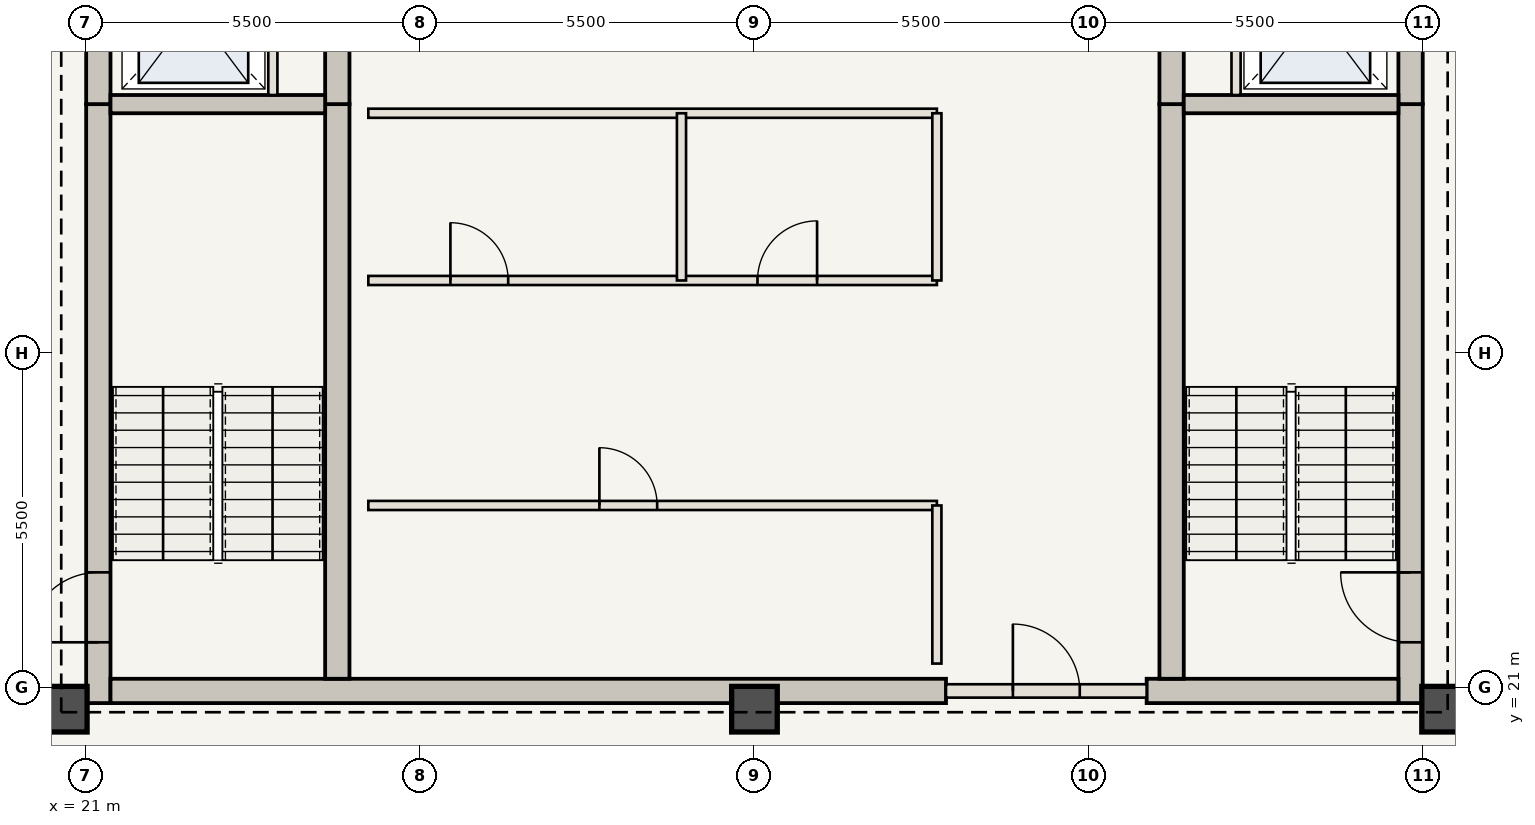
"""IFC4 building model, lengths in metres.
Left out: names, types, materials, properties, quantities, classifications, styles, units other than length and angle.
Written with IfcOpenShell. Run it as: python <this file> out.ifc"""

import sys

from ifc_helpers import new_model, si_unit, direction, frame, frame_2d, origin, origin_2d, place, context, subcontext, project, spatial, rectangle, extrude, element, fill, save


model = new_model("IFC4")
c1 = context("Model", 3, precision=1e-05, world=origin(), true_north=direction((0.0, 1.0)))
c2 = subcontext(c1, "Body", "Model", "MODEL_VIEW")
j1 = project(units=[si_unit("LENGTHUNIT", "METRE"), si_unit("PLANEANGLEUNIT", "RADIAN")], contexts=[c1])
p1 = place(None, origin())
s1 = spatial("IfcSite", under=j1, at=p1, CompositionType="ELEMENT")
p2 = place(p1, origin())
s2 = spatial("IfcBuilding", under=s1, at=p2, CompositionType="ELEMENT")
p3 = place(p2, frame((0.0, 0.0, 277.55)))
s3 = spatial("IfcBuildingStorey", under=s2, at=p3, CompositionType="ELEMENT", Elevation=277.55)
p4 = place(p3, frame((21.21, 20.75, 0.0), z_axis=(0.0, 0.0, 1.0), x_axis=(0.0, 1.0, 0.0)))
e1 = element("IfcWall", 1, at=p4, inside=s3, PredefinedType="SHEAR", context=c2, shape_type="SweptSolid", body=[
    extrude(rectangle(XDim=9.85, YDim=0.4, at=frame_2d((4.925, 0.0))), origin(), (0.0, 0.0, 1.0), 3.85),
])
p5 = place(p4, frame((1.0, 0.0, 0.0)))
e2 = element("IfcOpeningElement", 2, at=p5, cuts=e1, PredefinedType="OPENING", context=c2, shape_type="SweptSolid", body=[
    extrude(rectangle(XDim=1.15, YDim=2.15, at=frame_2d((0.575, 1.075))), frame((0.0, 0.21, 0.0), z_axis=(0.0, -1.0, 0.0), x_axis=(1.0, 0.0, 0.0)), (0.0, 0.0, 1.0), 0.42),
])
p6 = place(p3, frame((21.21, 30.6, 0.0), z_axis=(0.0, 0.0, 1.0), x_axis=(0.0, 1.0, 0.0)))
e3 = element("IfcWall", 3, at=p6, inside=s3, PredefinedType="SHEAR", context=c2, shape_type="SweptSolid", body=[
    extrude(rectangle(XDim=12.6, YDim=0.4, at=frame_2d((6.3, 0.0))), origin(), (0.0, 0.0, 1.0), 3.85),
])
p7 = place(p6, frame((4.2, 0.0, 0.0)))
e4 = element("IfcOpeningElement", 4, at=p7, cuts=e3, PredefinedType="OPENING", context=c2, shape_type="SweptSolid", body=[
    extrude(rectangle(XDim=1.1, YDim=2.15, at=frame_2d((0.55, 1.075))), frame((0.0, 0.21, 0.0), z_axis=(0.0, -1.0, 0.0), x_axis=(1.0, 0.0, 0.0)), (0.0, 0.0, 1.0), 0.42),
])
p8 = place(p6, frame((9.2, 0.0, 0.0)))
e5 = element("IfcOpeningElement", 5, at=p8, cuts=e3, PredefinedType="OPENING", context=c2, shape_type="SweptSolid", body=[
    extrude(rectangle(XDim=0.92, YDim=2.1, at=frame_2d((0.46, 1.05))), frame((0.0, 0.21, 0.0), z_axis=(0.0, -1.0, 0.0), x_axis=(1.0, 0.0, 0.0)), (0.0, 0.0, 1.0), 0.42),
])
p9 = place(p3, frame((42.79, 20.75, 0.0), z_axis=(0.0, 0.0, 1.0), x_axis=(0.0, 1.0, 0.0)))
e6 = element("IfcWall", 6, at=p9, inside=s3, PredefinedType="SHEAR", context=c2, shape_type="SweptSolid", body=[
    extrude(rectangle(XDim=9.85, YDim=0.4, at=frame_2d((4.925, 0.0))), origin(), (0.0, 0.0, 1.0), 3.85),
])
p10 = place(p9, frame((1.0, 0.0, 0.0)))
e7 = element("IfcOpeningElement", 7, at=p10, cuts=e6, PredefinedType="OPENING", context=c2, shape_type="SweptSolid", body=[
    extrude(rectangle(XDim=1.15, YDim=2.15, at=frame_2d((0.575, 1.075))), frame((0.0, 0.21, 0.0), z_axis=(0.0, -1.0, 0.0), x_axis=(1.0, 0.0, 0.0)), (0.0, 0.0, 1.0), 0.42),
])
p11 = place(p3, frame((42.79, 30.6, 0.0), z_axis=(0.0, 0.0, 1.0), x_axis=(0.0, 1.0, 0.0)))
e8 = element("IfcWall", 8, at=p11, inside=s3, PredefinedType="SHEAR", context=c2, shape_type="SweptSolid", body=[
    extrude(rectangle(XDim=12.6, YDim=0.4, at=frame_2d((6.3, 0.0))), origin(), (0.0, 0.0, 1.0), 3.85),
])
p12 = place(p11, frame((4.2, 0.0, 0.0)))
e9 = element("IfcOpeningElement", 9, at=p12, cuts=e8, PredefinedType="OPENING", context=c2, shape_type="SweptSolid", body=[
    extrude(rectangle(XDim=1.1, YDim=2.15, at=frame_2d((0.55, 1.075))), frame((0.0, 0.21, 0.0), z_axis=(0.0, -1.0, 0.0), x_axis=(1.0, 0.0, 0.0)), (0.0, 0.0, 1.0), 0.42),
])
p13 = place(p11, frame((8.05, 0.0, 0.0)))
e10 = element("IfcOpeningElement", 10, at=p13, cuts=e8, PredefinedType="OPENING", context=c2, shape_type="SweptSolid", body=[
    extrude(rectangle(XDim=0.88, YDim=2.1, at=frame_2d((0.44, 1.05))), frame((0.0, 0.21, 0.0), z_axis=(0.0, -1.0, 0.0), x_axis=(1.0, 0.0, 0.0)), (0.0, 0.0, 1.0), 0.42),
])
p14 = place(p11, frame((9.45, 0.0, 0.0)))
e11 = element("IfcOpeningElement", 11, at=p14, cuts=e8, PredefinedType="OPENING", context=c2, shape_type="SweptSolid", body=[
    extrude(rectangle(XDim=0.88, YDim=2.1, at=frame_2d((0.44, 1.05))), frame((0.0, 0.21, 0.0), z_axis=(0.0, -1.0, 0.0), x_axis=(1.0, 0.0, 0.0)), (0.0, 0.0, 1.0), 0.42),
])
p15 = place(p11, frame((10.85, 0.0, 0.0)))
e12 = element("IfcOpeningElement", 12, at=p15, cuts=e8, PredefinedType="OPENING", context=c2, shape_type="SweptSolid", body=[
    extrude(rectangle(XDim=0.88, YDim=2.1, at=frame_2d((0.44, 1.05))), frame((0.0, 0.21, 0.0), z_axis=(0.0, -1.0, 0.0), x_axis=(1.0, 0.0, 0.0)), (0.0, 0.0, 1.0), 0.42),
])
p16 = place(p3, frame((21.41, 20.95, 0.0), z_axis=(0.0, 0.0, 1.0), x_axis=(1.0, 0.0, 0.0)))
e13 = element("IfcWall", 13, at=p16, inside=s3, PredefinedType="SHEAR", context=c2, shape_type="SweptSolid", body=[
    extrude(rectangle(XDim=13.74, YDim=0.4, at=frame_2d((6.87, 0.0))), origin(), (0.0, 0.0, 1.0), 3.85),
])
p17 = place(p3, frame((38.45, 20.95, 0.0), z_axis=(0.0, 0.0, 1.0), x_axis=(1.0, 0.0, 0.0)))
e14 = element("IfcWall", 14, at=p17, inside=s3, PredefinedType="SHEAR", context=c2, shape_type="SweptSolid", body=[
    extrude(rectangle(XDim=4.14, YDim=0.4, at=frame_2d((2.07, 0.0))), origin(), (0.0, 0.0, 1.0), 3.85),
])
p18 = place(p3, frame((25.14, 21.15, 0.0), z_axis=(0.0, 0.0, 1.0), x_axis=(0.0, 1.0, 0.0)))
e15 = element("IfcWall", 15, at=p18, inside=s3, PredefinedType="SHEAR", context=c2, shape_type="SweptSolid", body=[
    extrude(rectangle(XDim=9.45, YDim=0.4, at=frame_2d((4.725, 0.0))), origin(), (0.0, 0.0, 1.0), 3.85),
])
p19 = place(p3, frame((25.14, 30.6, 0.0), z_axis=(0.0, 0.0, 1.0), x_axis=(0.0, 1.0, 0.0)))
e16 = element("IfcWall", 16, at=p19, inside=s3, PredefinedType="SHEAR", context=c2, shape_type="SweptSolid", body=[
    extrude(rectangle(XDim=12.2, YDim=0.4, at=frame_2d((6.1, 0.0))), origin(), (0.0, 0.0, 1.0), 3.85),
])
p20 = place(p19, frame((6.25, 0.0, 0.0)))
e17 = element("IfcOpeningElement", 17, at=p20, cuts=e16, PredefinedType="OPENING", context=c2, shape_type="SweptSolid", body=[
    extrude(rectangle(XDim=1.1, YDim=2.15, at=frame_2d((0.55, 1.075))), frame((0.0, 0.21, 0.0), z_axis=(0.0, -1.0, 0.0), x_axis=(1.0, 0.0, 0.0)), (0.0, 0.0, 1.0), 0.42),
])
p21 = place(p3, frame((38.86, 21.15, 0.0), z_axis=(0.0, 0.0, 1.0), x_axis=(0.0, 1.0, 0.0)))
e18 = element("IfcWall", 18, at=p21, inside=s3, PredefinedType="SHEAR", context=c2, shape_type="SweptSolid", body=[
    extrude(rectangle(XDim=9.45, YDim=0.4, at=frame_2d((4.725, 0.0))), origin(), (0.0, 0.0, 1.0), 3.85),
])
p22 = place(p3, frame((38.86, 30.6, 0.0), z_axis=(0.0, 0.0, 1.0), x_axis=(0.0, 1.0, 0.0)))
e19 = element("IfcWall", 19, at=p22, inside=s3, PredefinedType="SHEAR", context=c2, shape_type="SweptSolid", body=[
    extrude(rectangle(XDim=12.2, YDim=0.4, at=frame_2d((6.1, 0.0))), origin(), (0.0, 0.0, 1.0), 3.85),
])
for number, where, z_axis, x_axis in (
    (20, (20.65, 20.65, 0.0), (0.0, 0.0, 1.0), (1.0, 0.0, 0.0)),
    (21, (32.0, 20.65, 0.0), (0.0, 0.0, 1.0), (1.0, 0.0, 0.0)),
    (22, (43.35, 20.65, 0.0), (0.0, 0.0, 1.0), (1.0, 0.0, 0.0)),
):
    element("IfcColumn", number, at=place(p3, frame(where, z_axis=z_axis, x_axis=x_axis)), inside=s3, PredefinedType="COLUMN", context=c2, shape_type="SweptSolid", body=[
        extrude(rectangle(XDim=0.75, YDim=0.75, at=origin_2d()), origin(), (0.0, 0.0, 1.0), 3.85),
    ])
for number, where, z_axis, x_axis in (
    (23, (21.41, 30.6, 0.0), (0.0, 0.0, 1.0), (1.0, 0.0, 0.0)),
    (24, (39.06, 30.6, 0.0), (0.0, 0.0, 1.0), (1.0, 0.0, 0.0)),
):
    element("IfcWall", number, at=place(p3, frame(where, z_axis=z_axis, x_axis=x_axis)), inside=s3, PredefinedType="SHEAR", context=c2, shape_type="SweptSolid", body=[
        extrude(rectangle(XDim=3.53, YDim=0.3, at=frame_2d((1.765, 0.0))), origin(), (0.0, 0.0, 1.0), 3.685),
    ])
for number, where, z_axis, x_axis in (
    (25, (24.08, 30.75, 0.0), (0.0, 0.0, 1.0), (0.0, 1.0, 0.0)),
    (26, (39.92, 30.75, 0.0), (0.0, 0.0, 1.0), (0.0, 1.0, 0.0)),
):
    element("IfcWall", number, at=place(p3, frame(where, z_axis=z_axis, x_axis=x_axis)), inside=s3, PredefinedType="STANDARD", context=c2, shape_type="SweptSolid", body=[
        extrude(rectangle(XDim=2.65, YDim=0.15, at=frame_2d((1.325, 0.0))), origin(), (0.0, 0.0, 1.0), 3.685),
    ])
p23 = place(p3, frame((35.15, 20.95, 0.0), z_axis=(0.0, 0.0, 1.0), x_axis=(1.0, 0.0, 0.0)))
e27 = element("IfcWall", 27, at=p23, inside=s3, PredefinedType="STANDARD", context=c2, shape_type="SweptSolid", body=[
    extrude(rectangle(XDim=3.3, YDim=0.22, at=frame_2d((1.65, 0.0))), origin(), (0.0, 0.0, 1.0), 3.685),
])
p24 = place(p23, frame((1.1, 0.0, 0.0)))
e28 = element("IfcOpeningElement", 28, at=p24, cuts=e27, PredefinedType="OPENING", context=c2, shape_type="SweptSolid", body=[
    extrude(rectangle(XDim=1.1, YDim=2.15, at=frame_2d((0.55, 1.075))), frame((0.0, 0.12, 0.0), z_axis=(0.0, -1.0, 0.0), x_axis=(1.0, 0.0, 0.0)), (0.0, 0.0, 1.0), 0.24),
])
p25 = place(p3, frame((25.65, 24.0, 0.0), z_axis=(0.0, 0.0, 1.0), x_axis=(1.0, 0.0, 0.0)))
e29 = element("IfcWall", 29, at=p25, inside=s3, PredefinedType="STANDARD", context=c2, shape_type="SweptSolid", body=[
    extrude(rectangle(XDim=9.35, YDim=0.15, at=frame_2d((4.675, 0.0))), origin(), (0.0, 0.0, 1.0), 3.685),
])
p26 = place(p25, frame((3.8, 0.0, 0.0)))
e30 = element("IfcOpeningElement", 30, at=p26, cuts=e29, PredefinedType="OPENING", context=c2, shape_type="SweptSolid", body=[
    extrude(rectangle(XDim=0.95, YDim=2.15, at=frame_2d((0.475, 1.075))), frame((0.0, 0.085, 0.0), z_axis=(0.0, -1.0, 0.0), x_axis=(1.0, 0.0, 0.0)), (0.0, 0.0, 1.0), 0.17),
])
p27 = place(p3, frame((35.0, 21.4, 0.0), z_axis=(0.0, 0.0, 1.0), x_axis=(0.0, 1.0, 0.0)))
e31 = element("IfcWall", 31, at=p27, inside=s3, PredefinedType="STANDARD", context=c2, shape_type="SweptSolid", body=[
    extrude(rectangle(XDim=2.6, YDim=0.15, at=frame_2d((1.3, 0.0))), origin(), (0.0, 0.0, 1.0), 3.685),
])
p28 = place(p3, frame((25.65, 27.7, 0.0), z_axis=(0.0, 0.0, 1.0), x_axis=(1.0, 0.0, 0.0)))
e32 = element("IfcWall", 32, at=p28, inside=s3, PredefinedType="STANDARD", context=c2, shape_type="SweptSolid", body=[
    extrude(rectangle(XDim=9.35, YDim=0.15, at=frame_2d((4.675, 0.0))), origin(), (0.0, 0.0, 1.0), 3.685),
])
p29 = place(p28, frame((1.35, 0.0, 0.0)))
e33 = element("IfcOpeningElement", 33, at=p29, cuts=e32, PredefinedType="OPENING", context=c2, shape_type="SweptSolid", body=[
    extrude(rectangle(XDim=0.95, YDim=2.15, at=frame_2d((0.475, 1.075))), frame((0.0, 0.085, 0.0), z_axis=(0.0, -1.0, 0.0), x_axis=(1.0, 0.0, 0.0)), (0.0, 0.0, 1.0), 0.17),
])
p30 = place(p28, frame((6.4, 0.0, 0.0)))
e34 = element("IfcOpeningElement", 34, at=p30, cuts=e32, PredefinedType="OPENING", context=c2, shape_type="SweptSolid", body=[
    extrude(rectangle(XDim=0.98, YDim=2.2, at=frame_2d((0.49, 1.1))), frame((0.0, 0.085, 0.0), z_axis=(0.0, -1.0, 0.0), x_axis=(1.0, 0.0, 0.0)), (0.0, 0.0, 1.0), 0.17),
])
p31 = place(p3, frame((25.65, 30.45, 0.0), z_axis=(0.0, 0.0, 1.0), x_axis=(1.0, 0.0, 0.0)))
e35 = element("IfcWall", 35, at=p31, inside=s3, PredefinedType="STANDARD", context=c2, shape_type="SweptSolid", body=[
    extrude(rectangle(XDim=9.35, YDim=0.15, at=frame_2d((4.675, 0.0))), origin(), (0.0, 0.0, 1.0), 3.685),
])
for number, where, z_axis, x_axis in (
    (36, (30.8, 27.7, 0.0), (0.0, 0.0, 1.0), (0.0, 1.0, 0.0)),
    (37, (35.0, 27.7, 0.0), (0.0, 0.0, 1.0), (0.0, 1.0, 0.0)),
):
    element("IfcWall", number, at=place(p3, frame(where, z_axis=z_axis, x_axis=x_axis)), inside=s3, PredefinedType="STANDARD", context=c2, shape_type="SweptSolid", body=[
        extrude(rectangle(XDim=2.75, YDim=0.15, at=frame_2d((1.375, 0.0))), origin(), (0.0, 0.0, 1.0), 3.685),
    ])
p32 = place(p5, origin())
e38 = element("IfcDoor", 38, at=p32, inside=s3, OperationType="SINGLE_SWING_LEFT", PredefinedType="DOOR", context=c2, shape_type="SweptSolid", body=[
    extrude(rectangle(XDim=1.15, YDim=2.15, at=frame_2d((0.575, 1.075))), frame((0.0, 0.025, 0.0), z_axis=(0.0, -1.0, 0.0), x_axis=(1.0, 0.0, 0.0)), (0.0, 0.0, 1.0), 0.05),
])
fill(e2, e38)
p33 = place(p10, origin())
e39 = element("IfcDoor", 39, at=p33, inside=s3, OperationType="SINGLE_SWING_RIGHT", PredefinedType="DOOR", context=c2, shape_type="SweptSolid", body=[
    extrude(rectangle(XDim=1.15, YDim=2.15, at=frame_2d((0.575, 1.075))), frame((0.0, 0.025, 0.0), z_axis=(0.0, -1.0, 0.0), x_axis=(1.0, 0.0, 0.0)), (0.0, 0.0, 1.0), 0.05),
])
fill(e7, e39)
p34 = place(p24, origin())
e40 = element("IfcDoor", 40, at=p34, inside=s3, OperationType="SINGLE_SWING_LEFT", PredefinedType="DOOR", context=c2, shape_type="SweptSolid", body=[
    extrude(rectangle(XDim=1.1, YDim=2.15, at=frame_2d((0.55, 1.075))), frame((0.0, 0.025, 0.0), z_axis=(0.0, -1.0, 0.0), x_axis=(1.0, 0.0, 0.0)), (0.0, 0.0, 1.0), 0.05),
])
fill(e28, e40)
p35 = place(p26, origin())
e41 = element("IfcDoor", 41, at=p35, inside=s3, OperationType="SINGLE_SWING_LEFT", PredefinedType="DOOR", context=c2, shape_type="SweptSolid", body=[
    extrude(rectangle(XDim=0.95, YDim=2.15, at=frame_2d((0.475, 1.075))), frame((0.0, 0.025, 0.0), z_axis=(0.0, -1.0, 0.0), x_axis=(1.0, 0.0, 0.0)), (0.0, 0.0, 1.0), 0.05),
])
fill(e30, e41)
p36 = place(p29, origin())
e42 = element("IfcDoor", 42, at=p36, inside=s3, OperationType="SINGLE_SWING_LEFT", PredefinedType="DOOR", context=c2, shape_type="SweptSolid", body=[
    extrude(rectangle(XDim=0.95, YDim=2.15, at=frame_2d((0.475, 1.075))), frame((0.0, 0.025, 0.0), z_axis=(0.0, -1.0, 0.0), x_axis=(1.0, 0.0, 0.0)), (0.0, 0.0, 1.0), 0.05),
])
fill(e33, e42)
p37 = place(p30, origin())
e43 = element("IfcDoor", 43, at=p37, inside=s3, OperationType="SINGLE_SWING_RIGHT", PredefinedType="DOOR", context=c2, shape_type="SweptSolid", body=[
    extrude(rectangle(XDim=0.98, YDim=2.2, at=frame_2d((0.49, 1.1))), frame((0.0, 0.025, 0.0), z_axis=(0.0, -1.0, 0.0), x_axis=(1.0, 0.0, 0.0)), (0.0, 0.0, 1.0), 0.05),
])
fill(e34, e43)
save(model, sys.argv[1])
